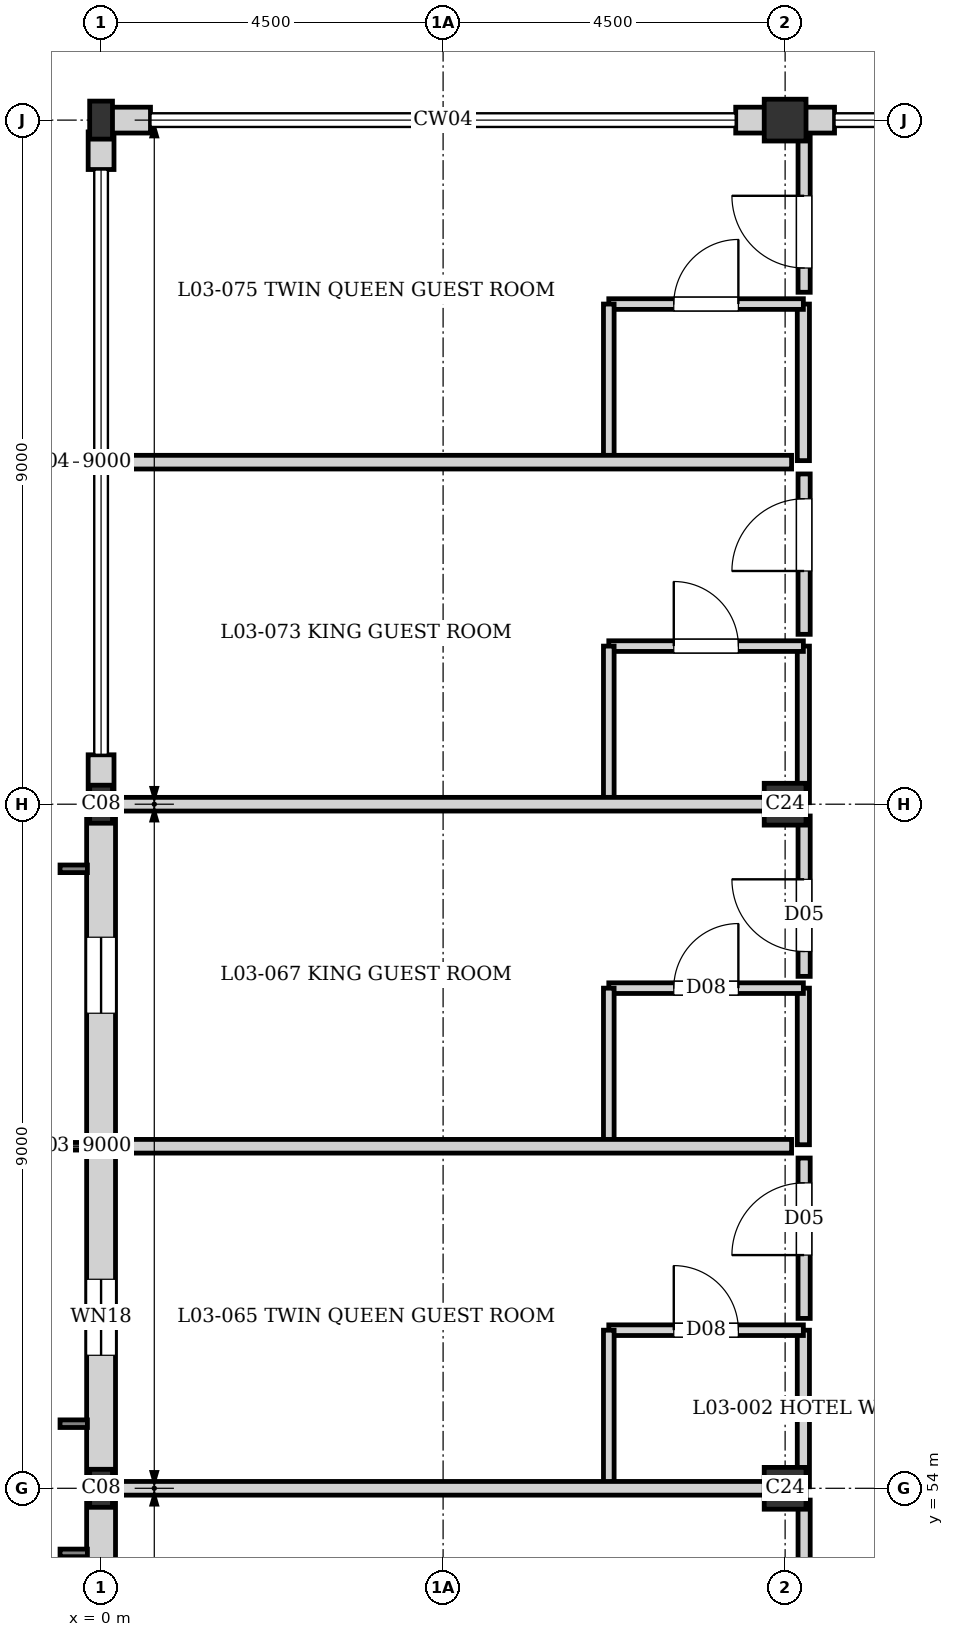
"""IFC4 building model, lengths in metres.
Left out: names, types, materials, properties, quantities, classifications, styles, units other than length and angle.
Written with IfcOpenShell. Run it as: python <this file> out.ifc"""

import sys

from ifc_helpers import new_model, si_unit, direction, frame, frame_2d, origin, origin_2d, place, context, subcontext, project, spatial, rectangle, i_section, extrude, element, fill, save


model = new_model("IFC4")
c1 = context("Model", 3, precision=1e-05, world=origin(), true_north=direction((0.0, 1.0)))
c2 = subcontext(c1, "Body", "Model", "MODEL_VIEW")
j1 = project(units=[si_unit("LENGTHUNIT", "METRE"), si_unit("PLANEANGLEUNIT", "RADIAN")], contexts=[c1])
p1 = place(None, origin())
s1 = spatial("IfcSite", under=j1, at=p1, CompositionType="ELEMENT")
p2 = place(p1, origin())
s2 = spatial("IfcBuilding", under=s1, at=p2, CompositionType="ELEMENT")
p3 = place(p2, frame((0.0, 0.0, 11.52)))
s3 = spatial("IfcBuildingStorey", under=s2, at=p3, CompositionType="ELEMENT", Elevation=11.52)
for number, where, z_axis, x_axis in (
    (1, (0.0, 54.0, 0.0), (0.0, 0.0, 1.0), (1.0, 0.0, 0.0)),
    (2, (0.0, 63.0, 0.0), (0.0, 0.0, 1.0), (1.0, 0.0, 0.0)),
    (3, (0.0, 72.0, 0.0), (0.0, 0.0, 1.0), (1.0, 0.0, 0.0)),
):
    element("IfcColumn", number, at=place(p3, frame(where, z_axis=z_axis, x_axis=x_axis)), inside=s3, PredefinedType="COLUMN", context=c2, shape_type="SweptSolid", body=[
        extrude(i_section(OverallWidth=0.3, OverallDepth=0.5, WebThickness=0.014, FlangeThickness=0.028, at=origin_2d()), origin(), (0.0, 0.0, 1.0), 3.04),
    ])
for number, where, z_axis, x_axis in (
    (4, (9.0, 54.0, 0.0), (0.0, 0.0, 1.0), (1.0, 0.0, 0.0)),
    (5, (9.0, 63.0, 0.0), (0.0, 0.0, 1.0), (1.0, 0.0, 0.0)),
    (6, (9.0, 72.0, 0.0), (0.0, 0.0, 1.0), (1.0, 0.0, 0.0)),
):
    element("IfcColumn", number, at=place(p3, frame(where, z_axis=z_axis, x_axis=x_axis)), inside=s3, PredefinedType="COLUMN", context=c2, shape_type="SweptSolid", body=[
        extrude(rectangle(XDim=0.55, YDim=0.55, at=origin_2d()), origin(), (0.0, 0.0, 1.0), 3.04),
    ])
p4 = place(p3, frame((0.0, 45.13, 0.0), z_axis=(0.0, 0.0, 1.0), x_axis=(0.0, 1.0, 0.0)))
e7 = element("IfcWall", 7, at=p4, inside=s3, PredefinedType="SOLIDWALL", context=c2, shape_type="SweptSolid", body=[
    extrude(rectangle(XDim=8.87, YDim=0.38, at=frame_2d((4.435, 0.0))), origin(), (0.0, 0.0, 1.0), 2.38),
])
p5 = place(p4, frame((1.62, 0.0, 0.35)))
e8 = element("IfcOpeningElement", 8, at=p5, cuts=e7, PredefinedType="OPENING", context=c2, shape_type="SweptSolid", body=[
    extrude(rectangle(XDim=1.0, YDim=1.6, at=frame_2d((0.5, 0.8))), frame((0.0, 0.2, 0.0), z_axis=(0.0, -1.0, 0.0), x_axis=(1.0, 0.0, 0.0)), (0.0, 0.0, 1.0), 0.4),
])
p6 = place(p4, frame((6.12, 0.0, 0.35)))
e9 = element("IfcOpeningElement", 9, at=p6, cuts=e7, PredefinedType="OPENING", context=c2, shape_type="SweptSolid", body=[
    extrude(rectangle(XDim=1.0, YDim=1.6, at=frame_2d((0.5, 0.8))), frame((0.0, 0.2, 0.0), z_axis=(0.0, -1.0, 0.0), x_axis=(1.0, 0.0, 0.0)), (0.0, 0.0, 1.0), 0.4),
])
p7 = place(p3, frame((0.0, 54.0, 0.0), z_axis=(0.0, 0.0, 1.0), x_axis=(0.0, 1.0, 0.0)))
e10 = element("IfcWall", 10, at=p7, inside=s3, PredefinedType="SOLIDWALL", context=c2, shape_type="SweptSolid", body=[
    extrude(rectangle(XDim=9.0, YDim=0.38, at=frame_2d((4.5, 0.0))), origin(), (0.0, 0.0, 1.0), 2.82),
])
p8 = place(p7, frame((1.75, 0.0, 0.35)))
e11 = element("IfcOpeningElement", 11, at=p8, cuts=e10, PredefinedType="OPENING", context=c2, shape_type="SweptSolid", body=[
    extrude(rectangle(XDim=1.0, YDim=1.6, at=frame_2d((0.5, 0.8))), frame((0.0, 0.2, 0.0), z_axis=(0.0, -1.0, 0.0), x_axis=(1.0, 0.0, 0.0)), (0.0, 0.0, 1.0), 0.4),
])
p9 = place(p7, frame((6.25, 0.0, 0.35)))
e12 = element("IfcOpeningElement", 12, at=p9, cuts=e10, PredefinedType="OPENING", context=c2, shape_type="SweptSolid", body=[
    extrude(rectangle(XDim=1.0, YDim=1.6, at=frame_2d((0.5, 0.8))), frame((0.0, 0.2, 0.0), z_axis=(0.0, -1.0, 0.0), x_axis=(1.0, 0.0, 0.0)), (0.0, 0.0, 1.0), 0.4),
])
p10 = place(p3, frame((0.0, 63.0, 0.0), z_axis=(0.0, 0.0, 1.0), x_axis=(0.0, 1.0, 0.0)))
e13 = element("IfcWall", 13, at=p10, inside=s3, PredefinedType="SOLIDWALL", context=c2, shape_type="SweptSolid", body=[
    extrude(rectangle(XDim=0.65, YDim=0.34, at=frame_2d((0.325, 0.0))), origin(), (0.0, 0.0, 1.0), 2.48),
])
p11 = place(p3, frame((0.0, 71.35, 0.0), z_axis=(0.0, 0.0, 1.0), x_axis=(0.0, 1.0, 0.0)))
e14 = element("IfcWall", 14, at=p11, inside=s3, PredefinedType="SOLIDWALL", context=c2, shape_type="SweptSolid", body=[
    extrude(rectangle(XDim=0.495, YDim=0.34, at=frame_2d((0.248, 0.0))), origin(), (0.0, 0.0, 1.0), 2.82),
])
for number, where, z_axis, x_axis in (
    (15, (0.0, 72.0, 0.0), (0.0, 0.0, 1.0), (1.0, 0.0, 0.0)),
    (16, (8.35, 72.0, 0.0), (0.0, 0.0, 1.0), (1.0, 0.0, 0.0)),
):
    element("IfcWall", number, at=place(p3, frame(where, z_axis=z_axis, x_axis=x_axis)), inside=s3, PredefinedType="SOLIDWALL", context=c2, shape_type="SweptSolid", body=[
        extrude(rectangle(XDim=0.65, YDim=0.34, at=frame_2d((0.325, 0.0))), origin(), (0.0, 0.0, 1.0), 2.48),
    ])
p12 = place(p3, frame((9.0, 72.0, 0.0), z_axis=(0.0, 0.0, 1.0), x_axis=(1.0, 0.0, 0.0)))
e17 = element("IfcWall", 17, at=p12, inside=s3, PredefinedType="SOLIDWALL", context=c2, shape_type="SweptSolid", body=[
    extrude(rectangle(XDim=0.65, YDim=0.34, at=frame_2d((0.325, 0.0))), origin(), (0.0, 0.0, 1.0), 2.42),
])
p13 = place(p3, frame((9.24, 54.02, 0.0), z_axis=(0.0, 0.0, 1.0), x_axis=(0.0, 1.0, 0.0)))
e18 = element("IfcWall", 18, at=p13, inside=s3, PredefinedType="PARTITIONING", context=c2, shape_type="SweptSolid", body=[
    extrude(rectangle(XDim=2.06, YDim=0.16, at=frame_2d((1.03, 0.0))), origin(), (0.0, 0.0, 1.0), 2.82),
])
p14 = place(p3, frame((6.68, 56.08, 0.0), z_axis=(0.0, 0.0, 1.0), x_axis=(1.0, 0.0, 0.0)))
e19 = element("IfcWall", 19, at=p14, inside=s3, PredefinedType="PLUMBINGWALL", context=c2, shape_type="SweptSolid", body=[
    extrude(rectangle(XDim=2.56, YDim=0.14, at=frame_2d((1.28, 0.0))), origin(), (0.0, 0.0, 1.0), 2.82),
])
p15 = place(p14, frame((0.855, 0.0, 0.0)))
e20 = element("IfcOpeningElement", 20, at=p15, cuts=e19, PredefinedType="OPENING", context=c2, shape_type="SweptSolid", body=[
    extrude(rectangle(XDim=0.85, YDim=2.04, at=frame_2d((0.425, 1.02))), frame((0.0, 0.08, 0.0), z_axis=(0.0, -1.0, 0.0), x_axis=(1.0, 0.0, 0.0)), (0.0, 0.0, 1.0), 0.16),
])
p16 = place(p3, frame((6.68, 54.02, 0.0), z_axis=(0.0, 0.0, 1.0), x_axis=(0.0, 1.0, 0.0)))
e21 = element("IfcWall", 21, at=p16, inside=s3, PredefinedType="PLUMBINGWALL", context=c2, shape_type="SweptSolid", body=[
    extrude(rectangle(XDim=2.06, YDim=0.14, at=frame_2d((1.03, 0.0))), origin(), (0.0, 0.0, 1.0), 2.82),
])
p17 = place(p3, frame((9.24, 58.52, 0.0), z_axis=(0.0, 0.0, 1.0), x_axis=(0.0, 1.0, 0.0)))
e22 = element("IfcWall", 22, at=p17, inside=s3, PredefinedType="PARTITIONING", context=c2, shape_type="SweptSolid", body=[
    extrude(rectangle(XDim=2.06, YDim=0.16, at=frame_2d((1.03, 0.0))), origin(), (0.0, 0.0, 1.0), 2.82),
])
p18 = place(p3, frame((6.68, 60.58, 0.0), z_axis=(0.0, 0.0, 1.0), x_axis=(1.0, 0.0, 0.0)))
e23 = element("IfcWall", 23, at=p18, inside=s3, PredefinedType="PLUMBINGWALL", context=c2, shape_type="SweptSolid", body=[
    extrude(rectangle(XDim=2.56, YDim=0.14, at=frame_2d((1.28, 0.0))), origin(), (0.0, 0.0, 1.0), 2.82),
])
p19 = place(p18, frame((0.855, 0.0, 0.0)))
e24 = element("IfcOpeningElement", 24, at=p19, cuts=e23, PredefinedType="OPENING", context=c2, shape_type="SweptSolid", body=[
    extrude(rectangle(XDim=0.85, YDim=2.04, at=frame_2d((0.425, 1.02))), frame((0.0, 0.08, 0.0), z_axis=(0.0, -1.0, 0.0), x_axis=(1.0, 0.0, 0.0)), (0.0, 0.0, 1.0), 0.16),
])
p20 = place(p3, frame((6.68, 58.52, 0.0), z_axis=(0.0, 0.0, 1.0), x_axis=(0.0, 1.0, 0.0)))
e25 = element("IfcWall", 25, at=p20, inside=s3, PredefinedType="PLUMBINGWALL", context=c2, shape_type="SweptSolid", body=[
    extrude(rectangle(XDim=2.06, YDim=0.14, at=frame_2d((1.03, 0.0))), origin(), (0.0, 0.0, 1.0), 2.82),
])
p21 = place(p3, frame((9.24, 63.02, 0.0), z_axis=(0.0, 0.0, 1.0), x_axis=(0.0, 1.0, 0.0)))
e26 = element("IfcWall", 26, at=p21, inside=s3, PredefinedType="PARTITIONING", context=c2, shape_type="SweptSolid", body=[
    extrude(rectangle(XDim=2.06, YDim=0.16, at=frame_2d((1.03, 0.0))), origin(), (0.0, 0.0, 1.0), 2.82),
])
p22 = place(p3, frame((6.68, 65.08, 0.0), z_axis=(0.0, 0.0, 1.0), x_axis=(1.0, 0.0, 0.0)))
e27 = element("IfcWall", 27, at=p22, inside=s3, PredefinedType="PLUMBINGWALL", context=c2, shape_type="SweptSolid", body=[
    extrude(rectangle(XDim=2.56, YDim=0.14, at=frame_2d((1.28, 0.0))), origin(), (0.0, 0.0, 1.0), 2.82),
])
p23 = place(p22, frame((0.855, 0.0, 0.0)))
e28 = element("IfcOpeningElement", 28, at=p23, cuts=e27, PredefinedType="OPENING", context=c2, shape_type="SweptSolid", body=[
    extrude(rectangle(XDim=0.85, YDim=2.04, at=frame_2d((0.425, 1.02))), frame((0.0, 0.08, 0.0), z_axis=(0.0, -1.0, 0.0), x_axis=(1.0, 0.0, 0.0)), (0.0, 0.0, 1.0), 0.16),
])
p24 = place(p3, frame((6.68, 63.02, 0.0), z_axis=(0.0, 0.0, 1.0), x_axis=(0.0, 1.0, 0.0)))
e29 = element("IfcWall", 29, at=p24, inside=s3, PredefinedType="PLUMBINGWALL", context=c2, shape_type="SweptSolid", body=[
    extrude(rectangle(XDim=2.06, YDim=0.14, at=frame_2d((1.03, 0.0))), origin(), (0.0, 0.0, 1.0), 2.82),
])
p25 = place(p3, frame((9.24, 67.52, 0.0), z_axis=(0.0, 0.0, 1.0), x_axis=(0.0, 1.0, 0.0)))
e30 = element("IfcWall", 30, at=p25, inside=s3, PredefinedType="PARTITIONING", context=c2, shape_type="SweptSolid", body=[
    extrude(rectangle(XDim=2.06, YDim=0.16, at=frame_2d((1.03, 0.0))), origin(), (0.0, 0.0, 1.0), 2.82),
])
p26 = place(p3, frame((6.68, 69.58, 0.0), z_axis=(0.0, 0.0, 1.0), x_axis=(1.0, 0.0, 0.0)))
e31 = element("IfcWall", 31, at=p26, inside=s3, PredefinedType="PLUMBINGWALL", context=c2, shape_type="SweptSolid", body=[
    extrude(rectangle(XDim=2.56, YDim=0.14, at=frame_2d((1.28, 0.0))), origin(), (0.0, 0.0, 1.0), 2.82),
])
p27 = place(p26, frame((0.855, 0.0, 0.0)))
e32 = element("IfcOpeningElement", 32, at=p27, cuts=e31, PredefinedType="OPENING", context=c2, shape_type="SweptSolid", body=[
    extrude(rectangle(XDim=0.85, YDim=2.04, at=frame_2d((0.425, 1.02))), frame((0.0, 0.08, 0.0), z_axis=(0.0, -1.0, 0.0), x_axis=(1.0, 0.0, 0.0)), (0.0, 0.0, 1.0), 0.16),
])
p28 = place(p3, frame((6.68, 67.52, 0.0), z_axis=(0.0, 0.0, 1.0), x_axis=(0.0, 1.0, 0.0)))
e33 = element("IfcWall", 33, at=p28, inside=s3, PredefinedType="PLUMBINGWALL", context=c2, shape_type="SweptSolid", body=[
    extrude(rectangle(XDim=2.06, YDim=0.14, at=frame_2d((1.03, 0.0))), origin(), (0.0, 0.0, 1.0), 2.82),
])
p29 = place(p3, frame((0.195, 54.0, 0.0), z_axis=(0.0, 0.0, 1.0), x_axis=(1.0, 0.0, 0.0)))
e34 = element("IfcWall", 34, at=p29, inside=s3, PredefinedType="PARTITIONING", context=c2, shape_type="SweptSolid", body=[
    extrude(rectangle(XDim=8.89, YDim=0.18, at=frame_2d((4.445, 0.0))), origin(), (0.0, 0.0, 1.0), 2.29),
])
p30 = place(p3, frame((0.195, 58.5, 0.0), z_axis=(0.0, 0.0, 1.0), x_axis=(1.0, 0.0, 0.0)))
e35 = element("IfcWall", 35, at=p30, inside=s3, PredefinedType="PARTITIONING", context=c2, shape_type="SweptSolid", body=[
    extrude(rectangle(XDim=8.89, YDim=0.18, at=frame_2d((4.445, 0.0))), origin(), (0.0, 0.0, 1.0), 2.82),
])
p31 = place(p3, frame((0.175, 63.0, 0.0), z_axis=(0.0, 0.0, 1.0), x_axis=(1.0, 0.0, 0.0)))
e36 = element("IfcWall", 36, at=p31, inside=s3, PredefinedType="PARTITIONING", context=c2, shape_type="SweptSolid", body=[
    extrude(rectangle(XDim=8.91, YDim=0.18, at=frame_2d((4.455, 0.0))), origin(), (0.0, 0.0, 1.0), 2.48),
])
p32 = place(p3, frame((0.095, 67.5, 0.0), z_axis=(0.0, 0.0, 1.0), x_axis=(1.0, 0.0, 0.0)))
e37 = element("IfcWall", 37, at=p32, inside=s3, PredefinedType="PARTITIONING", context=c2, shape_type="SweptSolid", body=[
    extrude(rectangle(XDim=8.99, YDim=0.18, at=frame_2d((4.495, 0.0))), origin(), (0.0, 0.0, 1.0), 2.82),
])
p33 = place(p3, frame((9.25, 51.735, 0.0), z_axis=(0.0, 0.0, 1.0), x_axis=(0.0, 1.0, 0.0)))
e38 = element("IfcWall", 38, at=p33, inside=s3, PredefinedType="PARTITIONING", context=c2, shape_type="SweptSolid", body=[
    extrude(rectangle(XDim=2.11, YDim=0.16, at=frame_2d((1.055, 0.0))), origin(), (0.0, 0.0, 1.0), 2.82),
])
p34 = place(p33, frame((0.327, 0.0, 0.0)))
e39 = element("IfcOpeningElement", 39, at=p34, cuts=e38, PredefinedType="OPENING", context=c2, shape_type="SweptSolid", body=[
    extrude(rectangle(XDim=0.95, YDim=2.15, at=frame_2d((0.475, 1.075))), frame((0.0, 0.09, 0.0), z_axis=(0.0, -1.0, 0.0), x_axis=(1.0, 0.0, 0.0)), (0.0, 0.0, 1.0), 0.18),
])
p35 = place(p3, frame((9.25, 56.235, 0.0), z_axis=(0.0, 0.0, 1.0), x_axis=(0.0, 1.0, 0.0)))
e40 = element("IfcWall", 40, at=p35, inside=s3, PredefinedType="PARTITIONING", context=c2, shape_type="SweptSolid", body=[
    extrude(rectangle(XDim=2.11, YDim=0.16, at=frame_2d((1.055, 0.0))), origin(), (0.0, 0.0, 1.0), 2.82),
])
p36 = place(p35, frame((0.833, 0.0, 0.0)))
e41 = element("IfcOpeningElement", 41, at=p36, cuts=e40, PredefinedType="OPENING", context=c2, shape_type="SweptSolid", body=[
    extrude(rectangle(XDim=0.95, YDim=2.15, at=frame_2d((0.475, 1.075))), frame((0.0, 0.09, 0.0), z_axis=(0.0, -1.0, 0.0), x_axis=(1.0, 0.0, 0.0)), (0.0, 0.0, 1.0), 0.18),
])
p37 = place(p3, frame((9.25, 60.735, 0.0), z_axis=(0.0, 0.0, 1.0), x_axis=(0.0, 1.0, 0.0)))
e42 = element("IfcWall", 42, at=p37, inside=s3, PredefinedType="PARTITIONING", context=c2, shape_type="SweptSolid", body=[
    extrude(rectangle(XDim=2.11, YDim=0.16, at=frame_2d((1.055, 0.0))), origin(), (0.0, 0.0, 1.0), 2.82),
])
p38 = place(p37, frame((0.327, 0.0, 0.0)))
e43 = element("IfcOpeningElement", 43, at=p38, cuts=e42, PredefinedType="OPENING", context=c2, shape_type="SweptSolid", body=[
    extrude(rectangle(XDim=0.95, YDim=2.15, at=frame_2d((0.475, 1.075))), frame((0.0, 0.09, 0.0), z_axis=(0.0, -1.0, 0.0), x_axis=(1.0, 0.0, 0.0)), (0.0, 0.0, 1.0), 0.18),
])
p39 = place(p3, frame((9.25, 65.235, 0.0), z_axis=(0.0, 0.0, 1.0), x_axis=(0.0, 1.0, 0.0)))
e44 = element("IfcWall", 44, at=p39, inside=s3, PredefinedType="PARTITIONING", context=c2, shape_type="SweptSolid", body=[
    extrude(rectangle(XDim=2.11, YDim=0.16, at=frame_2d((1.055, 0.0))), origin(), (0.0, 0.0, 1.0), 2.82),
])
p40 = place(p39, frame((0.833, 0.0, 0.0)))
e45 = element("IfcOpeningElement", 45, at=p40, cuts=e44, PredefinedType="OPENING", context=c2, shape_type="SweptSolid", body=[
    extrude(rectangle(XDim=0.95, YDim=2.15, at=frame_2d((0.475, 1.075))), frame((0.0, 0.09, 0.0), z_axis=(0.0, -1.0, 0.0), x_axis=(1.0, 0.0, 0.0)), (0.0, 0.0, 1.0), 0.18),
])
p41 = place(p3, frame((9.25, 69.735, 0.0), z_axis=(0.0, 0.0, 1.0), x_axis=(0.0, 1.0, 0.0)))
e46 = element("IfcWall", 46, at=p41, inside=s3, PredefinedType="PARTITIONING", context=c2, shape_type="SweptSolid", body=[
    extrude(rectangle(XDim=2.09, YDim=0.16, at=frame_2d((1.045, 0.0))), origin(), (0.0, 0.0, 1.0), 2.82),
])
p42 = place(p41, frame((0.319, 0.0, 0.0)))
e47 = element("IfcOpeningElement", 47, at=p42, cuts=e46, PredefinedType="OPENING", context=c2, shape_type="SweptSolid", body=[
    extrude(rectangle(XDim=0.95, YDim=2.15, at=frame_2d((0.475, 1.075))), frame((0.0, 0.09, 0.0), z_axis=(0.0, -1.0, 0.0), x_axis=(1.0, 0.0, 0.0)), (0.0, 0.0, 1.0), 0.18),
])
p43 = place(p8, origin())
e48 = element("IfcWindow", 48, at=p43, inside=s3, PartitioningType="SINGLE_PANEL", PredefinedType="WINDOW", context=c2, shape_type="SweptSolid", body=[
    extrude(rectangle(XDim=1.0, YDim=1.6, at=frame_2d((0.5, 0.8))), frame((0.0, 0.03, 0.0), z_axis=(0.0, -1.0, 0.0), x_axis=(1.0, 0.0, 0.0)), (0.0, 0.0, 1.0), 0.06),
])
fill(e11, e48)
p44 = place(p9, origin())
e49 = element("IfcWindow", 49, at=p44, inside=s3, PartitioningType="SINGLE_PANEL", PredefinedType="WINDOW", context=c2, shape_type="SweptSolid", body=[
    extrude(rectangle(XDim=1.0, YDim=1.6, at=frame_2d((0.5, 0.8))), frame((0.0, 0.03, 0.0), z_axis=(0.0, -1.0, 0.0), x_axis=(1.0, 0.0, 0.0)), (0.0, 0.0, 1.0), 0.06),
])
fill(e12, e49)
p45 = place(p15, origin())
e50 = element("IfcDoor", 50, at=p45, inside=s3, OperationType="SINGLE_SWING_LEFT", PredefinedType="DOOR", context=c2, shape_type="SweptSolid", body=[
    extrude(rectangle(XDim=0.85, YDim=2.04, at=frame_2d((0.425, 1.02))), frame((0.0, 0.025, 0.0), z_axis=(0.0, -1.0, 0.0), x_axis=(1.0, 0.0, 0.0)), (0.0, 0.0, 1.0), 0.05),
])
fill(e20, e50)
p46 = place(p19, origin())
e51 = element("IfcDoor", 51, at=p46, inside=s3, OperationType="SINGLE_SWING_RIGHT", PredefinedType="DOOR", context=c2, shape_type="SweptSolid", body=[
    extrude(rectangle(XDim=0.85, YDim=2.04, at=frame_2d((0.425, 1.02))), frame((0.0, 0.025, 0.0), z_axis=(0.0, -1.0, 0.0), x_axis=(1.0, 0.0, 0.0)), (0.0, 0.0, 1.0), 0.05),
])
fill(e24, e51)
p47 = place(p23, origin())
e52 = element("IfcDoor", 52, at=p47, inside=s3, OperationType="SINGLE_SWING_LEFT", PredefinedType="DOOR", context=c2, shape_type="SweptSolid", body=[
    extrude(rectangle(XDim=0.85, YDim=2.04, at=frame_2d((0.425, 1.02))), frame((0.0, 0.025, 0.0), z_axis=(0.0, -1.0, 0.0), x_axis=(1.0, 0.0, 0.0)), (0.0, 0.0, 1.0), 0.05),
])
fill(e28, e52)
p48 = place(p27, origin())
e53 = element("IfcDoor", 53, at=p48, inside=s3, OperationType="SINGLE_SWING_RIGHT", PredefinedType="DOOR", context=c2, shape_type="SweptSolid", body=[
    extrude(rectangle(XDim=0.85, YDim=2.04, at=frame_2d((0.425, 1.02))), frame((0.0, 0.025, 0.0), z_axis=(0.0, -1.0, 0.0), x_axis=(1.0, 0.0, 0.0)), (0.0, 0.0, 1.0), 0.05),
])
fill(e32, e53)
p49 = place(p36, origin())
e54 = element("IfcDoor", 54, at=p49, inside=s3, OperationType="SINGLE_SWING_LEFT", PredefinedType="DOOR", context=c2, shape_type="SweptSolid", body=[
    extrude(rectangle(XDim=0.95, YDim=2.15, at=frame_2d((0.475, 1.075))), frame((0.0, 0.025, 0.0), z_axis=(0.0, -1.0, 0.0), x_axis=(1.0, 0.0, 0.0)), (0.0, 0.0, 1.0), 0.05),
])
fill(e41, e54)
p50 = place(p38, origin())
e55 = element("IfcDoor", 55, at=p50, inside=s3, OperationType="SINGLE_SWING_RIGHT", PredefinedType="DOOR", context=c2, shape_type="SweptSolid", body=[
    extrude(rectangle(XDim=0.95, YDim=2.15, at=frame_2d((0.475, 1.075))), frame((0.0, 0.025, 0.0), z_axis=(0.0, -1.0, 0.0), x_axis=(1.0, 0.0, 0.0)), (0.0, 0.0, 1.0), 0.05),
])
fill(e43, e55)
p51 = place(p40, origin())
e56 = element("IfcDoor", 56, at=p51, inside=s3, OperationType="SINGLE_SWING_LEFT", PredefinedType="DOOR", context=c2, shape_type="SweptSolid", body=[
    extrude(rectangle(XDim=0.95, YDim=2.15, at=frame_2d((0.475, 1.075))), frame((0.0, 0.025, 0.0), z_axis=(0.0, -1.0, 0.0), x_axis=(1.0, 0.0, 0.0)), (0.0, 0.0, 1.0), 0.05),
])
fill(e45, e56)
p52 = place(p42, origin())
e57 = element("IfcDoor", 57, at=p52, inside=s3, OperationType="SINGLE_SWING_RIGHT", PredefinedType="DOOR", context=c2, shape_type="SweptSolid", body=[
    extrude(rectangle(XDim=0.95, YDim=2.15, at=frame_2d((0.475, 1.075))), frame((0.0, 0.025, 0.0), z_axis=(0.0, -1.0, 0.0), x_axis=(1.0, 0.0, 0.0)), (0.0, 0.0, 1.0), 0.05),
])
fill(e47, e57)
save(model, sys.argv[1])
